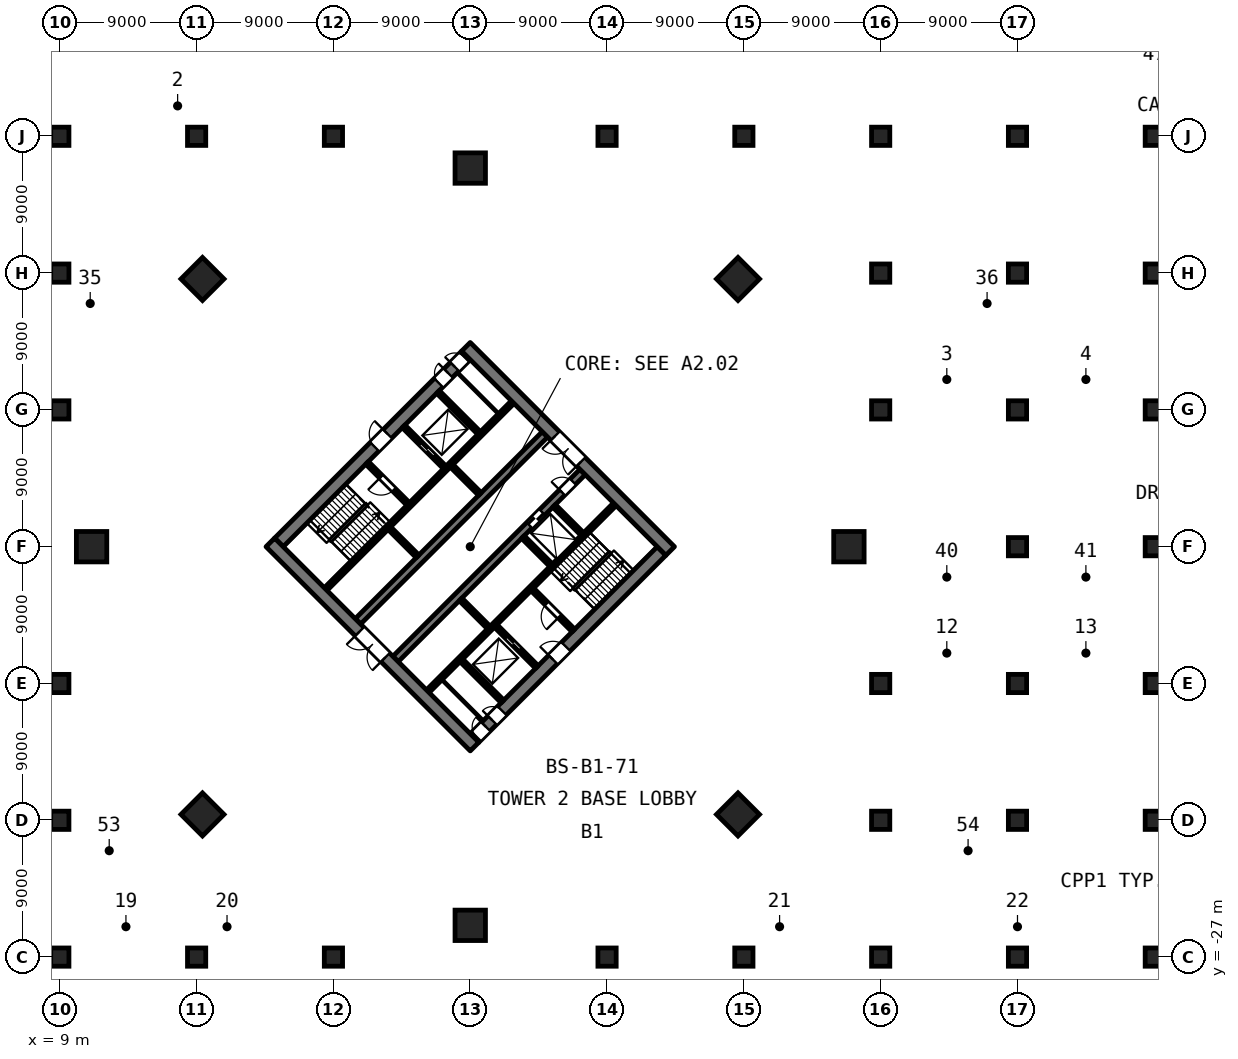
"""IFC4 building model, lengths in metres.
Left out: names, types, materials, properties, quantities, classifications, styles, units other than length and angle.
Written with IfcOpenShell. Run it as: python <this file> out.ifc"""

import sys

from ifc_helpers import new_model, si_unit, direction, frame, frame_2d, origin, origin_2d, place, context, subcontext, project, spatial, rectangle, extrude, element, fill, save


model = new_model("IFC4")
c1 = context("Model", 3, precision=1e-05, world=origin(), true_north=direction((0.0, 1.0)))
c2 = subcontext(c1, "Body", "Model", "MODEL_VIEW")
j1 = project(units=[si_unit("LENGTHUNIT", "METRE"), si_unit("PLANEANGLEUNIT", "RADIAN")], contexts=[c1])
p1 = place(None, origin())
s1 = spatial("IfcSite", under=j1, at=p1, CompositionType="ELEMENT")
p2 = place(p1, origin())
s2 = spatial("IfcBuilding", under=s1, at=p2, CompositionType="ELEMENT")
p3 = place(p2, frame((0.0, 0.0, -4.5)))
s3 = spatial("IfcBuildingStorey", under=s2, at=p3, CompositionType="ELEMENT", Elevation=-4.5)
for number, where, z_axis, x_axis in (
    (1, (9.0, -27.0, 0.0), (0.0, 0.0, 1.0), (1.0, 0.0, 0.0)),
    (2, (9.0, -18.0, 0.0), (0.0, 0.0, 1.0), (1.0, 0.0, 0.0)),
    (3, (9.0, -9.0, 0.0), (0.0, 0.0, 1.0), (1.0, 0.0, 0.0)),
    (4, (9.0, 9.0, 0.0), (0.0, 0.0, 1.0), (1.0, 0.0, 0.0)),
    (5, (9.0, 18.0, 0.0), (0.0, 0.0, 1.0), (1.0, 0.0, 0.0)),
    (6, (9.0, 27.0, 0.0), (0.0, 0.0, 1.0), (1.0, 0.0, 0.0)),
    (7, (18.0, -27.0, 0.0), (0.0, 0.0, 1.0), (1.0, 0.0, 0.0)),
    (8, (18.0, 27.0, 0.0), (0.0, 0.0, 1.0), (1.0, 0.0, 0.0)),
    (9, (27.0, -27.0, 0.0), (0.0, 0.0, 1.0), (1.0, 0.0, 0.0)),
    (10, (27.0, 27.0, 0.0), (0.0, 0.0, 1.0), (1.0, 0.0, 0.0)),
    (11, (45.0, -27.0, 0.0), (0.0, 0.0, 1.0), (1.0, 0.0, 0.0)),
    (12, (45.0, 27.0, 0.0), (0.0, 0.0, 1.0), (1.0, 0.0, 0.0)),
    (13, (54.0, -27.0, 0.0), (0.0, 0.0, 1.0), (1.0, 0.0, 0.0)),
    (14, (54.0, 27.0, 0.0), (0.0, 0.0, 1.0), (1.0, 0.0, 0.0)),
    (15, (63.0, -27.0, 0.0), (0.0, 0.0, 1.0), (1.0, 0.0, 0.0)),
    (16, (63.0, -18.0, 0.0), (0.0, 0.0, 1.0), (1.0, 0.0, 0.0)),
    (17, (63.0, -9.0, 0.0), (0.0, 0.0, 1.0), (1.0, 0.0, 0.0)),
    (18, (63.0, 9.0, 0.0), (0.0, 0.0, 1.0), (1.0, 0.0, 0.0)),
    (19, (63.0, 18.0, 0.0), (0.0, 0.0, 1.0), (1.0, 0.0, 0.0)),
    (20, (63.0, 27.0, 0.0), (0.0, 0.0, 1.0), (1.0, 0.0, 0.0)),
    (21, (72.0, -27.0, 0.0), (0.0, 0.0, 1.0), (1.0, 0.0, 0.0)),
    (22, (72.0, -18.0, 0.0), (0.0, 0.0, 1.0), (1.0, 0.0, 0.0)),
    (23, (72.0, -9.0, 0.0), (0.0, 0.0, 1.0), (1.0, 0.0, 0.0)),
    (24, (72.0, 0.0, 0.0), (0.0, 0.0, 1.0), (1.0, 0.0, 0.0)),
    (25, (72.0, 9.0, 0.0), (0.0, 0.0, 1.0), (1.0, 0.0, 0.0)),
    (26, (72.0, 18.0, 0.0), (0.0, 0.0, 1.0), (1.0, 0.0, 0.0)),
    (27, (72.0, 27.0, 0.0), (0.0, 0.0, 1.0), (1.0, 0.0, 0.0)),
    (28, (81.0, -27.0, 0.0), (0.0, 0.0, 1.0), (1.0, 0.0, 0.0)),
    (29, (81.0, -18.0, 0.0), (0.0, 0.0, 1.0), (1.0, 0.0, 0.0)),
    (30, (81.0, -9.0, 0.0), (0.0, 0.0, 1.0), (1.0, 0.0, 0.0)),
    (31, (81.0, 0.0, 0.0), (0.0, 0.0, 1.0), (1.0, 0.0, 0.0)),
    (32, (81.0, 9.0, 0.0), (0.0, 0.0, 1.0), (1.0, 0.0, 0.0)),
    (33, (81.0, 18.0, 0.0), (0.0, 0.0, 1.0), (1.0, 0.0, 0.0)),
    (34, (81.0, 27.0, 0.0), (0.0, 0.0, 1.0), (1.0, 0.0, 0.0)),
):
    element("IfcColumn", number, at=place(p3, frame(where, z_axis=z_axis, x_axis=x_axis)), inside=s3, PredefinedType="COLUMN", context=c2, shape_type="SweptSolid", body=[
        extrude(rectangle(XDim=1.2, YDim=1.2, at=origin_2d()), origin(), (0.0, 0.0, 1.0), 4.5),
    ])
for number, where, z_axis, x_axis in (
    (35, (60.91, 0.0, 0.0), (0.0, 0.0, 1.0), (1.0, 0.0, 0.0)),
    (36, (53.614, 17.614, 0.0), (0.0, 0.0, 1.0), (0.707, 0.707, 0.0)),
    (37, (36.0, 24.91, 0.0), (0.0, 0.0, 1.0), (0.0, 1.0, 0.0)),
    (38, (18.386, 17.614, 0.0), (0.0, 0.0, 1.0), (-0.707, 0.707, 0.0)),
    (39, (11.09, 0.0, 0.0), (0.0, 0.0, 1.0), (-1.0, 0.0, 0.0)),
    (40, (18.386, -17.614, 0.0), (0.0, 0.0, 1.0), (-0.707, -0.707, 0.0)),
    (41, (36.0, -24.91, 0.0), (0.0, 0.0, 1.0), (0.0, -1.0, 0.0)),
    (42, (53.614, -17.614, 0.0), (0.0, 0.0, 1.0), (0.707, -0.707, 0.0)),
):
    element("IfcColumn", number, at=place(p3, frame(where, z_axis=z_axis, x_axis=x_axis)), inside=s3, PredefinedType="COLUMN", context=c2, shape_type="SweptSolid", body=[
        extrude(rectangle(XDim=2.0, YDim=2.0, at=origin_2d()), origin(), (0.0, 0.0, 1.0), 4.5),
    ])
p4 = place(p3, frame((36.283, -12.586, 0.0), z_axis=(0.0, 0.0, 1.0), x_axis=(0.707106781187, 0.707106781187, 0.0)))
e43 = element("IfcWall", 43, at=p4, inside=s3, PredefinedType="SHEAR", context=c2, shape_type="SweptSolid", body=[
    extrude(rectangle(XDim=17.4, YDim=0.8, at=frame_2d((8.7, 0.0))), origin(), (0.0, 0.0, 1.0), 4.2),
])
p5 = place(p4, frame((7.3, 0.0, 0.0)))
e44 = element("IfcOpeningElement", 44, at=p5, cuts=e43, PredefinedType="OPENING", context=c2, shape_type="SweptSolid", body=[
    extrude(rectangle(XDim=1.2, YDim=2.1, at=frame_2d((0.6, 1.05))), frame((0.0, 0.41, 0.0), z_axis=(0.0, -1.0, 0.0), x_axis=(1.0, 0.0, 0.0)), (0.0, 0.0, 1.0), 0.82),
])
p6 = place(p4, frame((0.15, 0.0, 0.0)))
e45 = element("IfcOpeningElement", 45, at=p6, cuts=e43, PredefinedType="OPENING", context=c2, shape_type="SweptSolid", body=[
    extrude(rectangle(XDim=0.9, YDim=2.1, at=frame_2d((0.45, 1.05))), frame((0.0, 0.41, 0.0), z_axis=(0.0, -1.0, 0.0), x_axis=(1.0, 0.0, 0.0)), (0.0, 0.0, 1.0), 0.82),
])
p7 = place(p4, frame((1.65, 0.0, 0.0)))
e46 = element("IfcOpeningElement", 46, at=p7, cuts=e43, PredefinedType="OPENING", context=c2, shape_type="SweptSolid", body=[
    extrude(rectangle(XDim=0.9, YDim=2.1, at=frame_2d((0.45, 1.05))), frame((0.0, 0.41, 0.0), z_axis=(0.0, -1.0, 0.0), x_axis=(1.0, 0.0, 0.0)), (0.0, 0.0, 1.0), 0.82),
])
p8 = place(p3, frame((33.207, -9.51, 0.0), z_axis=(0.0, 0.0, 1.0), x_axis=(0.707106781187, 0.707106781187, 0.0)))
e47 = element("IfcWall", 47, at=p8, inside=s3, PredefinedType="SHEAR", context=c2, shape_type="SweptSolid", body=[
    extrude(rectangle(XDim=17.4, YDim=0.25, at=frame_2d((8.7, 0.0))), origin(), (0.0, 0.0, 1.0), 4.2),
])
p9 = place(p3, frame((31.086, -7.389, 0.0), z_axis=(0.0, 0.0, 1.0), x_axis=(0.707106781187, 0.707106781187, 0.0)))
e48 = element("IfcWall", 48, at=p9, inside=s3, PredefinedType="SHEAR", context=c2, shape_type="SweptSolid", body=[
    extrude(rectangle(XDim=17.4, YDim=0.5, at=frame_2d((8.7, 0.0))), origin(), (0.0, 0.0, 1.0), 4.2),
])
p10 = place(p9, frame((12.45, 0.0, 0.0)))
e49 = element("IfcOpeningElement", 49, at=p10, cuts=e48, PredefinedType="OPENING", context=c2, shape_type="SweptSolid", body=[
    extrude(rectangle(XDim=1.2, YDim=2.1, at=frame_2d((0.6, 1.05))), frame((0.0, 0.26, 0.0), z_axis=(0.0, -1.0, 0.0), x_axis=(1.0, 0.0, 0.0)), (0.0, 0.0, 1.0), 0.52),
])
p11 = place(p9, frame((15.5, 0.0, 0.0)))
e50 = element("IfcOpeningElement", 50, at=p11, cuts=e48, PredefinedType="OPENING", context=c2, shape_type="SweptSolid", body=[
    extrude(rectangle(XDim=1.0, YDim=2.1, at=frame_2d((0.5, 1.05))), frame((0.0, 0.26, 0.0), z_axis=(0.0, -1.0, 0.0), x_axis=(1.0, 0.0, 0.0)), (0.0, 0.0, 1.0), 0.52),
])
p12 = place(p3, frame((28.611, -4.914, 0.0), z_axis=(0.0, 0.0, 1.0), x_axis=(0.707106781187, 0.707106781187, 0.0)))
e51 = element("IfcWall", 51, at=p12, inside=s3, PredefinedType="SHEAR", context=c2, shape_type="SweptSolid", body=[
    extrude(rectangle(XDim=17.4, YDim=0.5, at=frame_2d((8.7, 0.0))), origin(), (0.0, 0.0, 1.0), 4.2),
])
p13 = place(p3, frame((26.49, -2.793, 0.0), z_axis=(0.0, 0.0, 1.0), x_axis=(0.707106781187, 0.707106781187, 0.0)))
e52 = element("IfcWall", 52, at=p13, inside=s3, PredefinedType="SHEAR", context=c2, shape_type="SweptSolid", body=[
    extrude(rectangle(XDim=17.4, YDim=0.25, at=frame_2d((8.7, 0.0))), origin(), (0.0, 0.0, 1.0), 4.2),
])
p14 = place(p3, frame((23.414, 0.283, 0.0), z_axis=(0.0, 0.0, 1.0), x_axis=(0.707106781187, 0.707106781187, 0.0)))
e53 = element("IfcWall", 53, at=p14, inside=s3, PredefinedType="SHEAR", context=c2, shape_type="SweptSolid", body=[
    extrude(rectangle(XDim=17.4, YDim=0.8, at=frame_2d((8.7, 0.0))), origin(), (0.0, 0.0, 1.0), 4.2),
])
p15 = place(p14, frame((8.9, 0.0, 0.0)))
e54 = element("IfcOpeningElement", 54, at=p15, cuts=e53, PredefinedType="OPENING", context=c2, shape_type="SweptSolid", body=[
    extrude(rectangle(XDim=1.2, YDim=2.1, at=frame_2d((0.6, 1.05))), frame((0.0, 0.41, 0.0), z_axis=(0.0, -1.0, 0.0), x_axis=(1.0, 0.0, 0.0)), (0.0, 0.0, 1.0), 0.82),
])
p16 = place(p14, frame((14.85, 0.0, 0.0)))
e55 = element("IfcOpeningElement", 55, at=p16, cuts=e53, PredefinedType="OPENING", context=c2, shape_type="SweptSolid", body=[
    extrude(rectangle(XDim=0.9, YDim=2.1, at=frame_2d((0.45, 1.05))), frame((0.0, 0.41, 0.0), z_axis=(0.0, -1.0, 0.0), x_axis=(1.0, 0.0, 0.0)), (0.0, 0.0, 1.0), 0.82),
])
p17 = place(p14, frame((16.35, 0.0, 0.0)))
e56 = element("IfcOpeningElement", 56, at=p17, cuts=e53, PredefinedType="OPENING", context=c2, shape_type="SweptSolid", body=[
    extrude(rectangle(XDim=0.9, YDim=2.1, at=frame_2d((0.45, 1.05))), frame((0.0, 0.41, 0.0), z_axis=(0.0, -1.0, 0.0), x_axis=(1.0, 0.0, 0.0)), (0.0, 0.0, 1.0), 0.82),
])
p18 = place(p3, frame((36.283, -13.152, 0.0), z_axis=(0.0, 0.0, 1.0), x_axis=(-0.707106781187, 0.707106781187, 0.0)))
e57 = element("IfcWall", 57, at=p18, inside=s3, PredefinedType="SHEAR", context=c2, shape_type="SweptSolid", body=[
    extrude(rectangle(XDim=19.0, YDim=0.8, at=frame_2d((9.5, 0.0))), origin(), (0.0, 0.0, 1.0), 4.2),
])
p19 = place(p18, frame((8.3, 0.0, 0.0)))
e58 = element("IfcOpeningElement", 58, at=p19, cuts=e57, PredefinedType="OPENING", context=c2, shape_type="SweptSolid", body=[
    extrude(rectangle(XDim=2.4, YDim=2.1, at=frame_2d((1.2, 1.05))), frame((0.0, 0.41, 0.0), z_axis=(0.0, -1.0, 0.0), x_axis=(1.0, 0.0, 0.0)), (0.0, 0.0, 1.0), 0.82),
])
p20 = place(p3, frame((36.848, -11.455, 0.0), z_axis=(0.0, 0.0, 1.0), x_axis=(-0.707106781187, 0.707106781187, 0.0)))
e59 = element("IfcWall", 59, at=p20, inside=s3, PredefinedType="PARTITIONING", context=c2, shape_type="SweptSolid", body=[
    extrude(rectangle(XDim=3.825, YDim=0.15, at=frame_2d((1.913, 0.0))), origin(), (0.0, 0.0, 1.0), 4.2),
])
p21 = place(p3, frame((38.121, -10.182, 0.0), z_axis=(0.0, 0.0, 1.0), x_axis=(-0.707138693938, 0.707074866995, 0.0)))
e60 = element("IfcWall", 60, at=p21, inside=s3, PredefinedType="SHEAR", context=c2, shape_type="SweptSolid", body=[
    extrude(rectangle(XDim=3.825, YDim=0.25, at=frame_2d((1.913, 0.0))), origin(), (0.0, 0.0, 1.0), 4.2),
])
for number, where, z_axis, x_axis in (
    (61, (37.22, -5.321, 0.0), (0.0, 0.0, 1.0), (-0.707, 0.707, 0.0)),
    (62, (32.535, -0.636, 0.0), (0.0, 0.0, 1.0), (-0.707, 0.707, 0.0)),
):
    element("IfcWall", number, at=place(p3, frame(where, z_axis=z_axis, x_axis=x_axis)), inside=s3, PredefinedType="SHEAR", context=c2, shape_type="SweptSolid", body=[
        extrude(rectangle(XDim=2.625, YDim=0.25, at=frame_2d((1.312, 0.0))), origin(), (0.0, 0.0, 1.0), 4.2),
    ])
p22 = place(p3, frame((40.384, -7.92, 0.0), z_axis=(0.0, 0.0, 1.0), x_axis=(-0.707074866995, 0.707138693938, 0.0)))
e63 = element("IfcWall", 63, at=p22, inside=s3, PredefinedType="SHEAR", context=c2, shape_type="SweptSolid", body=[
    extrude(rectangle(XDim=3.825, YDim=0.25, at=frame_2d((1.913, 0.0))), origin(), (0.0, 0.0, 1.0), 4.2),
])
p23 = place(p22, frame((1.6, 0.0, 0.0)))
e64 = element("IfcOpeningElement", 64, at=p23, cuts=e63, PredefinedType="OPENING", context=c2, shape_type="SweptSolid", body=[
    extrude(rectangle(XDim=1.2, YDim=2.1, at=frame_2d((0.6, 1.05))), frame((0.0, 0.135, 0.0), z_axis=(0.0, -1.0, 0.0), x_axis=(1.0, 0.0, 0.0)), (0.0, 0.0, 1.0), 0.27),
])
p24 = place(p3, frame((31.917, 2.811, 0.0), z_axis=(0.0, 0.0, 1.0), x_axis=(-0.707106781187, 0.707106781187, 0.0)))
e65 = element("IfcWall", 65, at=p24, inside=s3, PredefinedType="SHEAR", context=c2, shape_type="SweptSolid", body=[
    extrude(rectangle(XDim=3.825, YDim=0.25, at=frame_2d((1.913, 0.0))), origin(), (0.0, 0.0, 1.0), 4.2),
])
p25 = place(p24, frame((1.325, 0.0, 0.0)))
e66 = element("IfcOpeningElement", 66, at=p25, cuts=e65, PredefinedType="OPENING", context=c2, shape_type="SweptSolid", body=[
    extrude(rectangle(XDim=1.2, YDim=2.1, at=frame_2d((0.6, 1.05))), frame((0.0, 0.135, 0.0), z_axis=(0.0, -1.0, 0.0), x_axis=(1.0, 0.0, 0.0)), (0.0, 0.0, 1.0), 0.27),
])
p26 = place(p3, frame((42.788, -5.515, 0.0), z_axis=(0.0, 0.0, 1.0), x_axis=(-0.707106781187, 0.707106781187, 0.0)))
e67 = element("IfcWall", 67, at=p26, inside=s3, PredefinedType="SHEAR", context=c2, shape_type="SweptSolid", body=[
    extrude(rectangle(XDim=3.825, YDim=0.25, at=frame_2d((1.913, 0.0))), origin(), (0.0, 0.0, 1.0), 4.2),
])
p27 = place(p26, frame((1.3, 0.0, 0.0)))
e68 = element("IfcOpeningElement", 68, at=p27, cuts=e67, PredefinedType="OPENING", context=c2, shape_type="SweptSolid", body=[
    extrude(rectangle(XDim=1.2, YDim=2.1, at=frame_2d((0.6, 1.05))), frame((0.0, 0.135, 0.0), z_axis=(0.0, -1.0, 0.0), x_axis=(1.0, 0.0, 0.0)), (0.0, 0.0, 1.0), 0.27),
])
p28 = place(p3, frame((34.321, 5.215, 0.0), z_axis=(0.0, 0.0, 1.0), x_axis=(-0.707074866995, 0.707138693938, 0.0)))
e69 = element("IfcWall", 69, at=p28, inside=s3, PredefinedType="SHEAR", context=c2, shape_type="SweptSolid", body=[
    extrude(rectangle(XDim=3.825, YDim=0.25, at=frame_2d((1.913, 0.0))), origin(), (0.0, 0.0, 1.0), 4.2),
])
p29 = place(p28, frame((1.025, 0.0, 0.0)))
e70 = element("IfcOpeningElement", 70, at=p29, cuts=e69, PredefinedType="OPENING", context=c2, shape_type="SweptSolid", body=[
    extrude(rectangle(XDim=1.2, YDim=2.1, at=frame_2d((0.6, 1.05))), frame((0.0, 0.135, 0.0), z_axis=(0.0, -1.0, 0.0), x_axis=(1.0, 0.0, 0.0)), (0.0, 0.0, 1.0), 0.27),
])
for number, where, z_axis, x_axis in (
    (71, (41.321, -1.22, 0.0), (0.0, 0.0, 1.0), (-0.707, 0.707, 0.0)),
    (72, (36.636, 3.465, 0.0), (0.0, 0.0, 1.0), (-0.707, 0.707, 0.0)),
):
    element("IfcWall", number, at=place(p3, frame(where, z_axis=z_axis, x_axis=x_axis)), inside=s3, PredefinedType="SHEAR", context=c2, shape_type="SweptSolid", body=[
        extrude(rectangle(XDim=2.625, YDim=0.25, at=frame_2d((1.312, 0.0))), origin(), (0.0, 0.0, 1.0), 4.2),
    ])
p30 = place(p3, frame((36.583, 7.478, 0.0), z_axis=(0.0, 0.0, 1.0), x_axis=(-0.707138693938, 0.707074866995, 0.0)))
e73 = element("IfcWall", 73, at=p30, inside=s3, PredefinedType="SHEAR", context=c2, shape_type="SweptSolid", body=[
    extrude(rectangle(XDim=3.825, YDim=0.25, at=frame_2d((1.913, 0.0))), origin(), (0.0, 0.0, 1.0), 4.2),
])
p31 = place(p3, frame((43.372, 0.831, 0.0), z_axis=(0.0, 0.0, 1.0), x_axis=(-0.707106781187, 0.707106781187, 0.0)))
e74 = element("IfcWall", 74, at=p31, inside=s3, PredefinedType="SHEAR", context=c2, shape_type="SweptSolid", body=[
    extrude(rectangle(XDim=2.625, YDim=0.25, at=frame_2d((1.312, 0.0))), origin(), (0.0, 0.0, 1.0), 4.2),
])
p32 = place(p3, frame((37.856, 8.75, 0.0), z_axis=(0.0, 0.0, 1.0), x_axis=(-0.707106781187, 0.707106781187, 0.0)))
e75 = element("IfcWall", 75, at=p32, inside=s3, PredefinedType="PARTITIONING", context=c2, shape_type="SweptSolid", body=[
    extrude(rectangle(XDim=3.825, YDim=0.15, at=frame_2d((1.913, 0.0))), origin(), (0.0, 0.0, 1.0), 4.2),
])
p33 = place(p3, frame((49.152, -0.283, 0.0), z_axis=(0.0, 0.0, 1.0), x_axis=(-0.707106781187, 0.707106781187, 0.0)))
e76 = element("IfcWall", 76, at=p33, inside=s3, PredefinedType="SHEAR", context=c2, shape_type="SweptSolid", body=[
    extrude(rectangle(XDim=19.0, YDim=0.8, at=frame_2d((9.5, 0.0))), origin(), (0.0, 0.0, 1.0), 4.2),
])
p34 = place(p33, frame((8.3, 0.0, 0.0)))
e77 = element("IfcOpeningElement", 77, at=p34, cuts=e76, PredefinedType="OPENING", context=c2, shape_type="SweptSolid", body=[
    extrude(rectangle(XDim=2.4, YDim=2.1, at=frame_2d((1.2, 1.05))), frame((0.0, 0.41, 0.0), z_axis=(0.0, -1.0, 0.0), x_axis=(1.0, 0.0, 0.0)), (0.0, 0.0, 1.0), 0.82),
])
p35 = place(p19, origin())
e78 = element("IfcDoor", 78, at=p35, inside=s3, OperationType="DOUBLE_DOOR_SINGLE_SWING", PredefinedType="DOOR", context=c2, shape_type="SweptSolid", body=[
    extrude(rectangle(XDim=2.4, YDim=2.1, at=frame_2d((1.2, 1.05))), frame((0.0, -0.225, 0.0), z_axis=(0.0, -1.0, 0.0), x_axis=(1.0, 0.0, 0.0)), (0.0, 0.0, 1.0), 0.05),
])
fill(e58, e78)
p36 = place(p34, origin())
e79 = element("IfcDoor", 79, at=p36, inside=s3, OperationType="DOUBLE_DOOR_SINGLE_SWING", PredefinedType="DOOR", context=c2, shape_type="SweptSolid", body=[
    extrude(rectangle(XDim=2.4, YDim=2.1, at=frame_2d((1.2, 1.05))), frame((0.0, 0.275, 0.0), z_axis=(0.0, -1.0, 0.0), x_axis=(1.0, 0.0, 0.0)), (0.0, 0.0, 1.0), 0.05),
])
fill(e77, e79)
p37 = place(p10, origin())
e80 = element("IfcDoor", 80, at=p37, inside=s3, OperationType="SLIDING_TO_LEFT", PredefinedType="DOOR", context=c2, shape_type="SweptSolid", body=[
    extrude(rectangle(XDim=1.2, YDim=2.1, at=frame_2d((0.6, 1.05))), frame((0.0, 0.025, 0.0), z_axis=(0.0, -1.0, 0.0), x_axis=(1.0, 0.0, 0.0)), (0.0, 0.0, 1.0), 0.05),
])
fill(e49, e80)
p38 = place(p29, origin())
e81 = element("IfcDoor", 81, at=p38, inside=s3, OperationType="SLIDING_TO_LEFT", PredefinedType="DOOR", context=c2, shape_type="SweptSolid", body=[
    extrude(rectangle(XDim=1.2, YDim=2.1, at=frame_2d((0.6, 1.05))), frame((0.0, 0.025, 0.0), z_axis=(0.0, -1.0, 0.0), x_axis=(1.0, 0.0, 0.0)), (0.0, 0.0, 1.0), 0.05),
])
fill(e70, e81)
p39 = place(p23, origin())
e82 = element("IfcDoor", 82, at=p39, inside=s3, OperationType="SLIDING_TO_LEFT", PredefinedType="DOOR", context=c2, shape_type="SweptSolid", body=[
    extrude(rectangle(XDim=1.2, YDim=2.1, at=frame_2d((0.6, 1.05))), frame((0.0, 0.025, 0.0), z_axis=(0.0, -1.0, 0.0), x_axis=(1.0, 0.0, 0.0)), (0.0, 0.0, 1.0), 0.05),
])
fill(e64, e82)
p40 = place(p11, origin())
e83 = element("IfcDoor", 83, at=p40, inside=s3, OperationType="SINGLE_SWING_LEFT", PredefinedType="DOOR", context=c2, shape_type="SweptSolid", body=[
    extrude(rectangle(XDim=1.0, YDim=2.1, at=frame_2d((0.5, 1.05))), frame((0.0, 0.025, 0.0), z_axis=(0.0, -1.0, 0.0), x_axis=(1.0, 0.0, 0.0)), (0.0, 0.0, 1.0), 0.05),
])
fill(e50, e83)
p41 = place(p25, origin())
e84 = element("IfcDoor", 84, at=p41, inside=s3, OperationType="SINGLE_SWING_RIGHT", PredefinedType="DOOR", context=c2, shape_type="SweptSolid", body=[
    extrude(rectangle(XDim=1.2, YDim=2.1, at=frame_2d((0.6, 1.05))), frame((0.0, 0.025, 0.0), z_axis=(0.0, -1.0, 0.0), x_axis=(1.0, 0.0, 0.0)), (0.0, 0.0, 1.0), 0.05),
])
fill(e66, e84)
p42 = place(p27, origin())
e85 = element("IfcDoor", 85, at=p42, inside=s3, OperationType="SINGLE_SWING_LEFT", PredefinedType="DOOR", context=c2, shape_type="SweptSolid", body=[
    extrude(rectangle(XDim=1.2, YDim=2.1, at=frame_2d((0.6, 1.05))), frame((0.0, 0.025, 0.0), z_axis=(0.0, -1.0, 0.0), x_axis=(1.0, 0.0, 0.0)), (0.0, 0.0, 1.0), 0.05),
])
fill(e68, e85)
p43 = place(p15, origin())
e86 = element("IfcDoor", 86, at=p43, inside=s3, OperationType="SINGLE_SWING_RIGHT", PredefinedType="DOOR", context=c2, shape_type="SweptSolid", body=[
    extrude(rectangle(XDim=1.2, YDim=2.1, at=frame_2d((0.6, 1.05))), frame((0.0, -0.225, 0.0), z_axis=(0.0, -1.0, 0.0), x_axis=(1.0, 0.0, 0.0)), (0.0, 0.0, 1.0), 0.05),
])
fill(e54, e86)
p44 = place(p5, origin())
e87 = element("IfcDoor", 87, at=p44, inside=s3, OperationType="SINGLE_SWING_LEFT", PredefinedType="DOOR", context=c2, shape_type="SweptSolid", body=[
    extrude(rectangle(XDim=1.2, YDim=2.1, at=frame_2d((0.6, 1.05))), frame((0.0, 0.275, 0.0), z_axis=(0.0, -1.0, 0.0), x_axis=(1.0, 0.0, 0.0)), (0.0, 0.0, 1.0), 0.05),
])
fill(e44, e87)
p45 = place(p16, origin())
e88 = element("IfcDoor", 88, at=p45, inside=s3, OperationType="SINGLE_SWING_RIGHT", PredefinedType="DOOR", context=c2, shape_type="SweptSolid", body=[
    extrude(rectangle(XDim=0.9, YDim=2.1, at=frame_2d((0.45, 1.05))), frame((0.0, -0.225, 0.0), z_axis=(0.0, -1.0, 0.0), x_axis=(1.0, 0.0, 0.0)), (0.0, 0.0, 1.0), 0.05),
])
fill(e55, e88)
p46 = place(p17, origin())
e89 = element("IfcDoor", 89, at=p46, inside=s3, OperationType="SINGLE_SWING_LEFT", PredefinedType="DOOR", context=c2, shape_type="SweptSolid", body=[
    extrude(rectangle(XDim=0.9, YDim=2.1, at=frame_2d((0.45, 1.05))), frame((0.0, -0.225, 0.0), z_axis=(0.0, -1.0, 0.0), x_axis=(1.0, 0.0, 0.0)), (0.0, 0.0, 1.0), 0.05),
])
fill(e56, e89)
p47 = place(p6, origin())
e90 = element("IfcDoor", 90, at=p47, inside=s3, OperationType="SINGLE_SWING_RIGHT", PredefinedType="DOOR", context=c2, shape_type="SweptSolid", body=[
    extrude(rectangle(XDim=0.9, YDim=2.1, at=frame_2d((0.45, 1.05))), frame((0.0, 0.275, 0.0), z_axis=(0.0, -1.0, 0.0), x_axis=(1.0, 0.0, 0.0)), (0.0, 0.0, 1.0), 0.05),
])
fill(e45, e90)
p48 = place(p7, origin())
e91 = element("IfcDoor", 91, at=p48, inside=s3, OperationType="SINGLE_SWING_LEFT", PredefinedType="DOOR", context=c2, shape_type="SweptSolid", body=[
    extrude(rectangle(XDim=0.9, YDim=2.1, at=frame_2d((0.45, 1.05))), frame((0.0, 0.275, 0.0), z_axis=(0.0, -1.0, 0.0), x_axis=(1.0, 0.0, 0.0)), (0.0, 0.0, 1.0), 0.05),
])
fill(e46, e91)
save(model, sys.argv[1])
